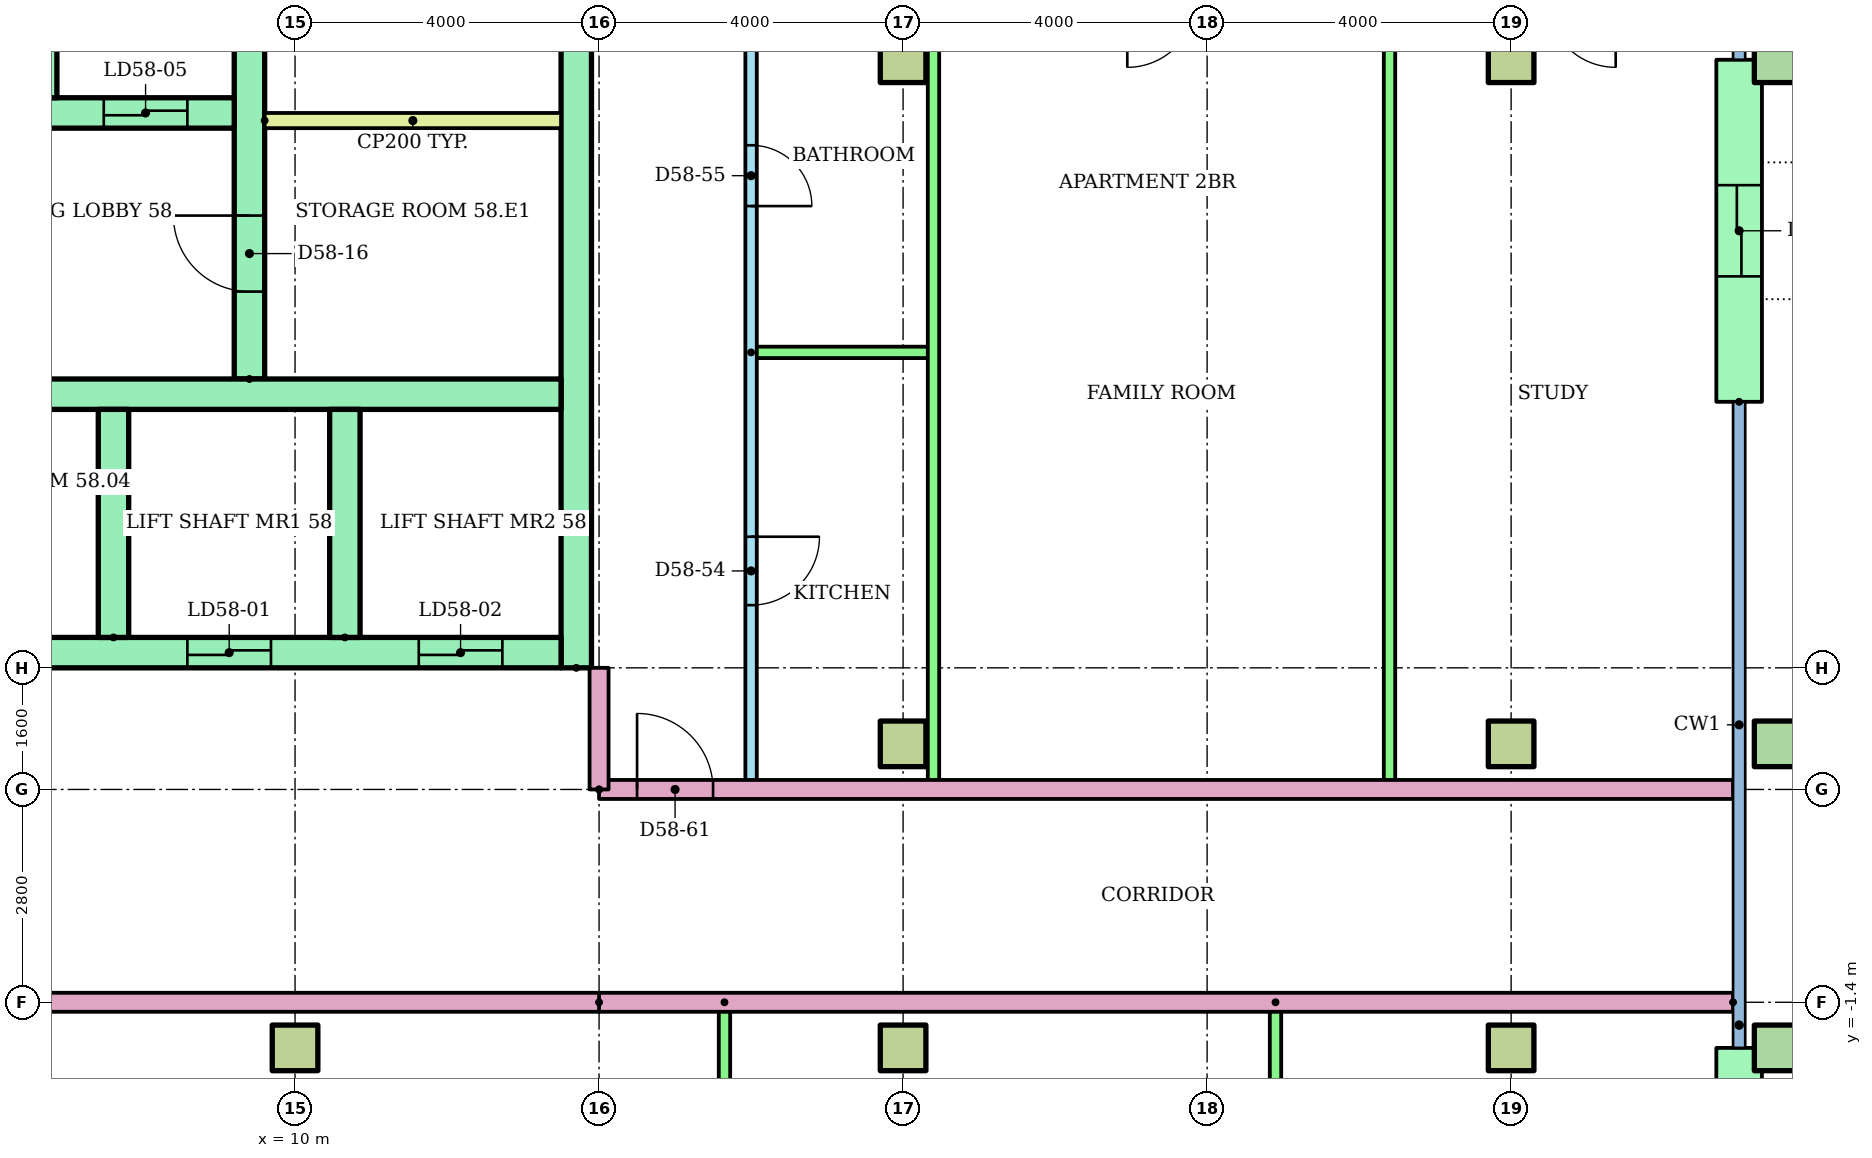
"""IFC4 building model, lengths in metres.
Left out: names, types, materials, properties, quantities, classifications, styles, units other than length and angle.
Written with IfcOpenShell. Run it as: python <this file> out.ifc"""

import sys

from ifc_helpers import new_model, si_unit, direction, frame, frame_2d, origin, origin_2d, place, context, subcontext, project, spatial, rectangle, hollow_rectangle, extrude, element, fill, save


model = new_model("IFC4")
c1 = context("Model", 3, precision=1e-05, world=origin(), true_north=direction((0.0, 1.0)))
c2 = subcontext(c1, "Body", "Model", "MODEL_VIEW")
j1 = project(units=[si_unit("LENGTHUNIT", "METRE"), si_unit("PLANEANGLEUNIT", "RADIAN")], contexts=[c1])
p1 = place(None, origin())
s1 = spatial("IfcSite", under=j1, at=p1, CompositionType="ELEMENT")
p2 = place(p1, origin())
s2 = spatial("IfcBuilding", under=s1, at=p2, CompositionType="ELEMENT")
p3 = place(p2, frame((0.0, 0.0, 223.6)))
s3 = spatial("IfcBuildingStorey", under=s2, at=p3, CompositionType="ELEMENT", Elevation=223.6)
for number, where in (
    (1, (10.0, -2.0, 0.0)),
    (2, (18.0, -2.0, 0.0)),
    (3, (26.0, -2.0, 0.0)),
):
    element("IfcColumn", number, at=place(p3, frame(where)), inside=s3, PredefinedType="COLUMN", context=c2, shape_type="SweptSolid", body=[
        extrude(rectangle(XDim=0.6, YDim=0.6, at=origin_2d()), origin(), (0.0, 0.0, 1.0), 3.2),
    ])
p4 = place(p3, frame((29.5, -2.0, 0.0)))
e4 = element("IfcColumn", 4, at=p4, inside=s3, PredefinedType="COLUMN", context=c2, shape_type="SweptSolid", body=[
    extrude(hollow_rectangle(XDim=0.6, YDim=0.6, WallThickness=0.03, at=origin_2d()), origin(), (0.0, 0.0, 1.0), 3.2),
])
for number, where in (
    (5, (18.0, 2.0, 0.0)),
    (6, (26.0, 2.0, 0.0)),
):
    element("IfcColumn", number, at=place(p3, frame(where)), inside=s3, PredefinedType="COLUMN", context=c2, shape_type="SweptSolid", body=[
        extrude(rectangle(XDim=0.6, YDim=0.6, at=origin_2d()), origin(), (0.0, 0.0, 1.0), 3.2),
    ])
p5 = place(p3, frame((29.5, 2.0, 0.0)))
e7 = element("IfcColumn", 7, at=p5, inside=s3, PredefinedType="COLUMN", context=c2, shape_type="SweptSolid", body=[
    extrude(hollow_rectangle(XDim=0.6, YDim=0.6, WallThickness=0.03, at=origin_2d()), origin(), (0.0, 0.0, 1.0), 3.2),
])
for number, where in (
    (8, (18.0, 11.0, 0.0)),
    (9, (26.0, 11.0, 0.0)),
):
    element("IfcColumn", number, at=place(p3, frame(where)), inside=s3, PredefinedType="COLUMN", context=c2, shape_type="SweptSolid", body=[
        extrude(rectangle(XDim=0.6, YDim=0.6, at=origin_2d()), origin(), (0.0, 0.0, 1.0), 3.2),
    ])
p6 = place(p3, frame((29.5, 11.0, 0.0)))
e10 = element("IfcColumn", 10, at=p6, inside=s3, PredefinedType="COLUMN", context=c2, shape_type="SweptSolid", body=[
    extrude(hollow_rectangle(XDim=0.6, YDim=0.6, WallThickness=0.03, at=origin_2d()), origin(), (0.0, 0.0, 1.0), 3.2),
])
p7 = place(p3, frame((29.0, -5.7, 0.0), z_axis=(0.0, 0.0, 1.0), x_axis=(0.0, 1.0, 0.0)))
e11 = element("IfcWall", 11, at=p7, inside=s3, PredefinedType="STANDARD", context=c2, shape_type="SweptSolid", body=[
    extrude(rectangle(XDim=3.7, YDim=0.6, at=frame_2d((1.85, 0.0))), origin(), (0.0, 0.0, 1.0), 2.92),
])
p8 = place(p7, frame((1.25, 0.0, 0.0)))
e12 = element("IfcOpeningElement", 12, at=p8, cuts=e11, PredefinedType="OPENING", context=c2, shape_type="SweptSolid", body=[
    extrude(rectangle(XDim=1.2, YDim=2.1, at=frame_2d((0.6, 1.05))), frame((0.0, 0.31, 0.0), z_axis=(0.0, -1.0, 0.0), x_axis=(1.0, 0.0, 0.0)), (0.0, 0.0, 1.0), 0.62),
])
p9 = place(p3, frame((29.0, 6.5, 0.0), z_axis=(0.0, 0.0, 1.0), x_axis=(0.0, 1.0, 0.0)))
e13 = element("IfcWall", 13, at=p9, inside=s3, PredefinedType="STANDARD", context=c2, shape_type="SweptSolid", body=[
    extrude(rectangle(XDim=4.5, YDim=0.6, at=frame_2d((2.25, 0.0))), origin(), (0.0, 0.0, 1.0), 2.92),
])
p10 = place(p9, frame((1.65, 0.0, 0.0)))
e14 = element("IfcOpeningElement", 14, at=p10, cuts=e13, PredefinedType="OPENING", context=c2, shape_type="SweptSolid", body=[
    extrude(rectangle(XDim=1.2, YDim=2.1, at=frame_2d((0.6, 1.05))), frame((0.0, 0.31, 0.0), z_axis=(0.0, -1.0, 0.0), x_axis=(1.0, 0.0, 0.0)), (0.0, 0.0, 1.0), 0.62),
])
p11 = place(p3, frame((13.7, 3.0, 0.0), z_axis=(0.0, 0.0, 1.0), x_axis=(0.0, 1.0, 0.0)))
e15 = element("IfcWall", 15, at=p11, inside=s3, PredefinedType="SHEAR", context=c2, shape_type="SweptSolid", body=[
    extrude(rectangle(XDim=17.0, YDim=0.4, at=frame_2d((8.5, 0.0))), origin(), (0.0, 0.0, 1.0), 2.92),
])
p12 = place(p3, frame((9.4, 6.8, 0.0), z_axis=(0.0, 0.0, 1.0), x_axis=(0.0, 1.0, 0.0)))
e16 = element("IfcWall", 16, at=p12, inside=s3, PredefinedType="SHEAR", context=c2, shape_type="SweptSolid", body=[
    extrude(rectangle(XDim=12.7, YDim=0.4, at=frame_2d((6.35, 0.0))), origin(), (0.0, 0.0, 1.0), 2.92),
])
p13 = place(p12, frame((1.15, 0.0, 0.0)))
e17 = element("IfcOpeningElement", 17, at=p13, cuts=e16, PredefinedType="OPENING", context=c2, shape_type="SweptSolid", body=[
    extrude(rectangle(XDim=1.0, YDim=2.1, at=frame_2d((0.5, 1.05))), frame((0.0, 0.21, 0.0), z_axis=(0.0, -1.0, 0.0), x_axis=(1.0, 0.0, 0.0)), (0.0, 0.0, 1.0), 0.42),
])
p14 = place(p12, frame((7.925, 0.0, 0.0)))
e18 = element("IfcOpeningElement", 18, at=p14, cuts=e16, PredefinedType="OPENING", context=c2, shape_type="SweptSolid", body=[
    extrude(rectangle(XDim=1.0, YDim=2.1, at=frame_2d((0.5, 1.05))), frame((0.0, 0.21, 0.0), z_axis=(0.0, -1.0, 0.0), x_axis=(1.0, 0.0, 0.0)), (0.0, 0.0, 1.0), 0.42),
])
p15 = place(p3, frame((-13.5, 3.2, 0.0)))
e19 = element("IfcWall", 19, at=p15, inside=s3, PredefinedType="SHEAR", context=c2, shape_type="SweptSolid", body=[
    extrude(rectangle(XDim=27.0, YDim=0.4, at=frame_2d((13.5, 0.0))), origin(), (0.0, 0.0, 1.0), 2.92),
])
p16 = place(p15, frame((22.083, 0.0, 0.0)))
e20 = element("IfcOpeningElement", 20, at=p16, cuts=e19, PredefinedType="OPENING", context=c2, shape_type="SweptSolid", body=[
    extrude(rectangle(XDim=1.1, YDim=2.1, at=frame_2d((0.55, 1.05))), frame((0.0, 0.21, 0.0), z_axis=(0.0, -1.0, 0.0), x_axis=(1.0, 0.0, 0.0)), (0.0, 0.0, 1.0), 0.42),
])
p17 = place(p15, frame((25.128, 0.0, 0.0)))
e21 = element("IfcOpeningElement", 21, at=p17, cuts=e19, PredefinedType="OPENING", context=c2, shape_type="SweptSolid", body=[
    extrude(rectangle(XDim=1.1, YDim=2.1, at=frame_2d((0.55, 1.05))), frame((0.0, 0.21, 0.0), z_axis=(0.0, -1.0, 0.0), x_axis=(1.0, 0.0, 0.0)), (0.0, 0.0, 1.0), 0.42),
])
p18 = place(p15, frame((12.6, 0.0, 0.0)))
e22 = element("IfcOpeningElement", 22, at=p18, cuts=e19, PredefinedType="OPENING", context=c2, shape_type="SweptSolid", body=[
    extrude(rectangle(XDim=1.8, YDim=2.1, at=frame_2d((0.9, 1.05))), frame((0.0, 0.21, 0.0), z_axis=(0.0, -1.0, 0.0), x_axis=(1.0, 0.0, 0.0)), (0.0, 0.0, 1.0), 0.42),
])
p19 = place(p3, frame((1.522, 6.6, 0.0)))
e23 = element("IfcWall", 23, at=p19, inside=s3, PredefinedType="SHEAR", context=c2, shape_type="SweptSolid", body=[
    extrude(rectangle(XDim=11.978, YDim=0.4, at=frame_2d((5.989, 0.0))), origin(), (0.0, 0.0, 1.0), 2.92),
])
p20 = place(p19, frame((1.022, 0.0, 0.0)))
e24 = element("IfcOpeningElement", 24, at=p20, cuts=e23, PredefinedType="OPENING", context=c2, shape_type="SweptSolid", body=[
    extrude(rectangle(XDim=1.0, YDim=2.1, at=frame_2d((0.5, 1.05))), frame((0.0, 0.21, 0.0), z_axis=(0.0, -1.0, 0.0), x_axis=(1.0, 0.0, 0.0)), (0.0, 0.0, 1.0), 0.42),
])
p21 = place(p19, frame((4.067, 0.0, 0.0)))
e25 = element("IfcOpeningElement", 25, at=p21, cuts=e23, PredefinedType="OPENING", context=c2, shape_type="SweptSolid", body=[
    extrude(rectangle(XDim=1.0, YDim=2.1, at=frame_2d((0.5, 1.05))), frame((0.0, 0.21, 0.0), z_axis=(0.0, -1.0, 0.0), x_axis=(1.0, 0.0, 0.0)), (0.0, 0.0, 1.0), 0.42),
])
for number, where, z_axis, x_axis in (
    (26, (7.611, 3.4, 0.0), (0.0, 0.0, 1.0), (0.0, 1.0, 0.0)),
    (27, (10.656, 3.4, 0.0), (0.0, 0.0, 1.0), (0.0, 1.0, 0.0)),
):
    element("IfcWall", number, at=place(p3, frame(where, z_axis=z_axis, x_axis=x_axis)), inside=s3, PredefinedType="SHEAR", context=c2, shape_type="SweptSolid", body=[
        extrude(rectangle(XDim=3.0, YDim=0.4, at=frame_2d((1.5, 0.0))), origin(), (0.0, 0.0, 1.0), 2.92),
    ])
p22 = place(p3, frame((1.2, 10.3, 0.0)))
e28 = element("IfcWall", 28, at=p22, inside=s3, PredefinedType="SHEAR", context=c2, shape_type="SweptSolid", body=[
    extrude(rectangle(XDim=8.0, YDim=0.4, at=frame_2d((4.0, 0.0))), origin(), (0.0, 0.0, 1.0), 2.92),
])
p23 = place(p22, frame((3.55, 0.0, 0.0)))
e29 = element("IfcOpeningElement", 29, at=p23, cuts=e28, PredefinedType="OPENING", context=c2, shape_type="SweptSolid", body=[
    extrude(rectangle(XDim=1.1, YDim=2.1, at=frame_2d((0.55, 1.05))), frame((0.0, 0.21, 0.0), z_axis=(0.0, -1.0, 0.0), x_axis=(1.0, 0.0, 0.0)), (0.0, 0.0, 1.0), 0.42),
])
p24 = place(p22, frame((6.283, 0.0, 0.0)))
e30 = element("IfcOpeningElement", 30, at=p24, cuts=e28, PredefinedType="OPENING", context=c2, shape_type="SweptSolid", body=[
    extrude(rectangle(XDim=1.1, YDim=2.1, at=frame_2d((0.55, 1.05))), frame((0.0, 0.21, 0.0), z_axis=(0.0, -1.0, 0.0), x_axis=(1.0, 0.0, 0.0)), (0.0, 0.0, 1.0), 0.42),
])
p25 = place(p22, frame((0.867, 0.0, 0.0)))
e31 = element("IfcOpeningElement", 31, at=p25, cuts=e28, PredefinedType="OPENING", context=c2, shape_type="SweptSolid", body=[
    extrude(rectangle(XDim=1.0, YDim=2.1, at=frame_2d((0.5, 1.05))), frame((0.0, 0.21, 0.0), z_axis=(0.0, -1.0, 0.0), x_axis=(1.0, 0.0, 0.0)), (0.0, 0.0, 1.0), 0.42),
])
p26 = place(p3, frame((6.667, 10.5, 0.0), z_axis=(0.0, 0.0, 1.0), x_axis=(0.0, 1.0, 0.0)))
e32 = element("IfcWall", 32, at=p26, inside=s3, PredefinedType="SHEAR", context=c2, shape_type="SweptSolid", body=[
    extrude(rectangle(XDim=3.0, YDim=0.4, at=frame_2d((1.5, 0.0))), origin(), (0.0, 0.0, 1.0), 2.92),
])
p27 = place(p3, frame((9.6, 10.2, 0.0)))
e33 = element("IfcWall", 33, at=p27, inside=s3, PredefinedType="PARTITIONING", context=c2, shape_type="SweptSolid", body=[
    extrude(rectangle(XDim=3.9, YDim=0.2, at=frame_2d((1.95, 0.0))), origin(), (0.0, 0.0, 1.0), 2.92),
])
for number, where, z_axis, x_axis in (
    (34, (15.65, -1.4, 0.0), (0.0, 0.0, 1.0), (0.0, -1.0, 0.0)),
    (35, (22.9, -1.4, 0.0), (0.0, 0.0, 1.0), (0.0, -1.0, 0.0)),
):
    element("IfcWall", number, at=place(p3, frame(where, z_axis=z_axis, x_axis=x_axis)), inside=s3, PredefinedType="PARTITIONING", context=c2, shape_type="SweptSolid", body=[
        extrude(rectangle(XDim=8.0, YDim=0.15, at=frame_2d((4.0, 0.0))), origin(), (0.0, 0.0, 1.0), 2.4),
    ])
p28 = place(p3, frame((28.92, -1.4, 0.0), z_axis=(0.0, 0.0, 1.0), x_axis=(-1.0, 0.0, 0.0)))
e36 = element("IfcWall", 36, at=p28, inside=s3, PredefinedType="PARTITIONING", context=c2, shape_type="SweptSolid", body=[
    extrude(rectangle(XDim=14.92, YDim=0.25, at=frame_2d((7.46, 0.0))), origin(), (0.0, 0.0, 1.0), 2.4),
])
p29 = place(p3, frame((16.0, 11.8, 0.0), z_axis=(0.0, 0.0, 1.0), x_axis=(0.0, -1.0, 0.0)))
e37 = element("IfcWall", 37, at=p29, inside=s3, PredefinedType="PARTITIONING", context=c2, shape_type="SweptSolid", body=[
    extrude(rectangle(XDim=10.4, YDim=0.15, at=frame_2d((5.2, 0.0))), origin(), (0.0, 0.0, 1.0), 2.4),
])
p30 = place(p29, frame((7.075, 0.0, 0.0)))
e38 = element("IfcOpeningElement", 38, at=p30, cuts=e37, PredefinedType="OPENING", context=c2, shape_type="SweptSolid", body=[
    extrude(rectangle(XDim=0.9, YDim=2.1, at=frame_2d((0.45, 1.05))), frame((0.0, 0.085, 0.0), z_axis=(0.0, -1.0, 0.0), x_axis=(1.0, 0.0, 0.0)), (0.0, 0.0, 1.0), 0.17),
])
p31 = place(p29, frame((1.925, 0.0, 0.0)))
e39 = element("IfcOpeningElement", 39, at=p31, cuts=e37, PredefinedType="OPENING", context=c2, shape_type="SweptSolid", body=[
    extrude(rectangle(XDim=0.8, YDim=2.1, at=frame_2d((0.4, 1.05))), frame((0.0, 0.085, 0.0), z_axis=(0.0, -1.0, 0.0), x_axis=(1.0, 0.0, 0.0)), (0.0, 0.0, 1.0), 0.17),
])
p32 = place(p3, frame((16.0, 7.15, 0.0)))
e40 = element("IfcWall", 40, at=p32, inside=s3, PredefinedType="PARTITIONING", context=c2, shape_type="SweptSolid", body=[
    extrude(rectangle(XDim=2.4, YDim=0.15, at=frame_2d((1.2, 0.0))), origin(), (0.0, 0.0, 1.0), 2.4),
])
for number, where, z_axis, x_axis in (
    (41, (18.4, 11.8, 0.0), (0.0, 0.0, 1.0), (0.0, -1.0, 0.0)),
    (42, (24.4, 11.8, 0.0), (0.0, 0.0, 1.0), (0.0, -1.0, 0.0)),
):
    element("IfcWall", number, at=place(p3, frame(where, z_axis=z_axis, x_axis=x_axis)), inside=s3, PredefinedType="PARTITIONING", context=c2, shape_type="SweptSolid", body=[
        extrude(rectangle(XDim=10.4, YDim=0.15, at=frame_2d((5.2, 0.0))), origin(), (0.0, 0.0, 1.0), 2.4),
    ])
p33 = place(p3, frame((14.0, 1.4, 0.0)))
e43 = element("IfcWall", 43, at=p33, inside=s3, PredefinedType="PARTITIONING", context=c2, shape_type="SweptSolid", body=[
    extrude(rectangle(XDim=14.92, YDim=0.25, at=frame_2d((7.46, 0.0))), origin(), (0.0, 0.0, 1.0), 2.4),
])
p34 = place(p33, frame((0.5, 0.0, 0.0)))
e44 = element("IfcOpeningElement", 44, at=p34, cuts=e43, PredefinedType="OPENING", context=c2, shape_type="SweptSolid", body=[
    extrude(rectangle(XDim=1.0, YDim=2.1, at=frame_2d((0.5, 1.05))), frame((0.0, 0.135, 0.0), z_axis=(0.0, -1.0, 0.0), x_axis=(1.0, 0.0, 0.0)), (0.0, 0.0, 1.0), 0.27),
])
p35 = place(p3, frame((14.0, -1.4, 0.0), z_axis=(0.0, 0.0, 1.0), x_axis=(-1.0, 0.0, 0.0)))
e45 = element("IfcWall", 45, at=p35, inside=s3, PredefinedType="PARTITIONING", context=c2, shape_type="SweptSolid", body=[
    extrude(rectangle(XDim=28.0, YDim=0.25, at=frame_2d((14.0, 0.0))), origin(), (0.0, 0.0, 1.0), 2.4),
])
p36 = place(p35, frame((20.5, 0.0, 0.0)))
e46 = element("IfcOpeningElement", 46, at=p36, cuts=e45, PredefinedType="OPENING", context=c2, shape_type="SweptSolid", body=[
    extrude(rectangle(XDim=1.0, YDim=2.1, at=frame_2d((0.5, 1.05))), frame((0.0, 0.135, 0.0), z_axis=(0.0, -1.0, 0.0), x_axis=(1.0, 0.0, 0.0)), (0.0, 0.0, 1.0), 0.27),
])
p37 = place(p35, frame((12.5, 0.0, 0.0)))
e47 = element("IfcOpeningElement", 47, at=p37, cuts=e45, PredefinedType="OPENING", context=c2, shape_type="SweptSolid", body=[
    extrude(rectangle(XDim=1.0, YDim=2.1, at=frame_2d((0.5, 1.05))), frame((0.0, 0.135, 0.0), z_axis=(0.0, -1.0, 0.0), x_axis=(1.0, 0.0, 0.0)), (0.0, 0.0, 1.0), 0.27),
])
p38 = place(p35, frame((10.5, 0.0, 0.0)))
e48 = element("IfcOpeningElement", 48, at=p38, cuts=e45, PredefinedType="OPENING", context=c2, shape_type="SweptSolid", body=[
    extrude(rectangle(XDim=1.0, YDim=2.1, at=frame_2d((0.5, 1.05))), frame((0.0, 0.135, 0.0), z_axis=(0.0, -1.0, 0.0), x_axis=(1.0, 0.0, 0.0)), (0.0, 0.0, 1.0), 0.27),
])
p39 = place(p3, frame((14.0, 1.4, 0.0), z_axis=(0.0, 0.0, 1.0), x_axis=(0.0, 1.0, 0.0)))
e49 = element("IfcWall", 49, at=p39, inside=s3, PredefinedType="PARTITIONING", context=c2, shape_type="SweptSolid", body=[
    extrude(rectangle(XDim=1.6, YDim=0.25, at=frame_2d((0.8, 0.0))), origin(), (0.0, 0.0, 1.0), 2.4),
])
p40 = place(p16, origin())
e50 = element("IfcDoor", 50, at=p40, inside=s3, OperationType="SLIDING_TO_LEFT", PredefinedType="DOOR", context=c2, shape_type="SweptSolid", body=[
    extrude(rectangle(XDim=1.1, YDim=2.1, at=frame_2d((0.55, 1.05))), frame((0.0, 0.025, 0.0), z_axis=(0.0, -1.0, 0.0), x_axis=(1.0, 0.0, 0.0)), (0.0, 0.0, 1.0), 0.05),
])
fill(e20, e50)
p41 = place(p17, origin())
e51 = element("IfcDoor", 51, at=p41, inside=s3, OperationType="SLIDING_TO_LEFT", PredefinedType="DOOR", context=c2, shape_type="SweptSolid", body=[
    extrude(rectangle(XDim=1.1, YDim=2.1, at=frame_2d((0.55, 1.05))), frame((0.0, 0.025, 0.0), z_axis=(0.0, -1.0, 0.0), x_axis=(1.0, 0.0, 0.0)), (0.0, 0.0, 1.0), 0.05),
])
fill(e21, e51)
p42 = place(p24, origin())
e52 = element("IfcDoor", 52, at=p42, inside=s3, OperationType="SLIDING_TO_LEFT", PredefinedType="DOOR", context=c2, shape_type="SweptSolid", body=[
    extrude(rectangle(XDim=1.1, YDim=2.1, at=frame_2d((0.55, 1.05))), frame((0.0, 0.025, 0.0), z_axis=(0.0, -1.0, 0.0), x_axis=(1.0, 0.0, 0.0)), (0.0, 0.0, 1.0), 0.05),
])
fill(e30, e52)
p43 = place(p13, origin())
e53 = element("IfcDoor", 53, at=p43, inside=s3, OperationType="SINGLE_SWING_RIGHT", PredefinedType="DOOR", context=c2, shape_type="SweptSolid", body=[
    extrude(rectangle(XDim=1.0, YDim=2.1, at=frame_2d((0.5, 1.05))), frame((0.0, 0.025, 0.0), z_axis=(0.0, -1.0, 0.0), x_axis=(1.0, 0.0, 0.0)), (0.0, 0.0, 1.0), 0.05),
])
fill(e17, e53)
p44 = place(p30, origin())
e54 = element("IfcDoor", 54, at=p44, inside=s3, OperationType="SINGLE_SWING_LEFT", PredefinedType="DOOR", context=c2, shape_type="SweptSolid", body=[
    extrude(rectangle(XDim=0.9, YDim=2.1, at=frame_2d((0.45, 1.05))), frame((0.0, 0.025, 0.0), z_axis=(0.0, -1.0, 0.0), x_axis=(1.0, 0.0, 0.0)), (0.0, 0.0, 1.0), 0.05),
])
fill(e38, e54)
p45 = place(p31, origin())
e55 = element("IfcDoor", 55, at=p45, inside=s3, OperationType="SINGLE_SWING_RIGHT", PredefinedType="DOOR", context=c2, shape_type="SweptSolid", body=[
    extrude(rectangle(XDim=0.8, YDim=2.1, at=frame_2d((0.4, 1.05))), frame((0.0, 0.025, 0.0), z_axis=(0.0, -1.0, 0.0), x_axis=(1.0, 0.0, 0.0)), (0.0, 0.0, 1.0), 0.05),
])
fill(e39, e55)
p46 = place(p34, origin())
e56 = element("IfcDoor", 56, at=p46, inside=s3, OperationType="SINGLE_SWING_LEFT", PredefinedType="DOOR", context=c2, shape_type="SweptSolid", body=[
    extrude(rectangle(XDim=1.0, YDim=2.1, at=frame_2d((0.5, 1.05))), frame((0.0, 0.025, 0.0), z_axis=(0.0, -1.0, 0.0), x_axis=(1.0, 0.0, 0.0)), (0.0, 0.0, 1.0), 0.05),
])
fill(e44, e56)
p47 = place(p10, origin())
e57 = element("IfcDoor", 57, at=p47, inside=s3, OperationType="SLIDING_TO_LEFT", PredefinedType="DOOR", context=c2, shape_type="SweptSolid", body=[
    extrude(rectangle(XDim=1.2, YDim=2.1, at=frame_2d((0.6, 1.05))), frame((0.0, 0.025, 0.0), z_axis=(0.0, -1.0, 0.0), x_axis=(1.0, 0.0, 0.0)), (0.0, 0.0, 1.0), 0.05),
])
fill(e14, e57)
save(model, sys.argv[1])
